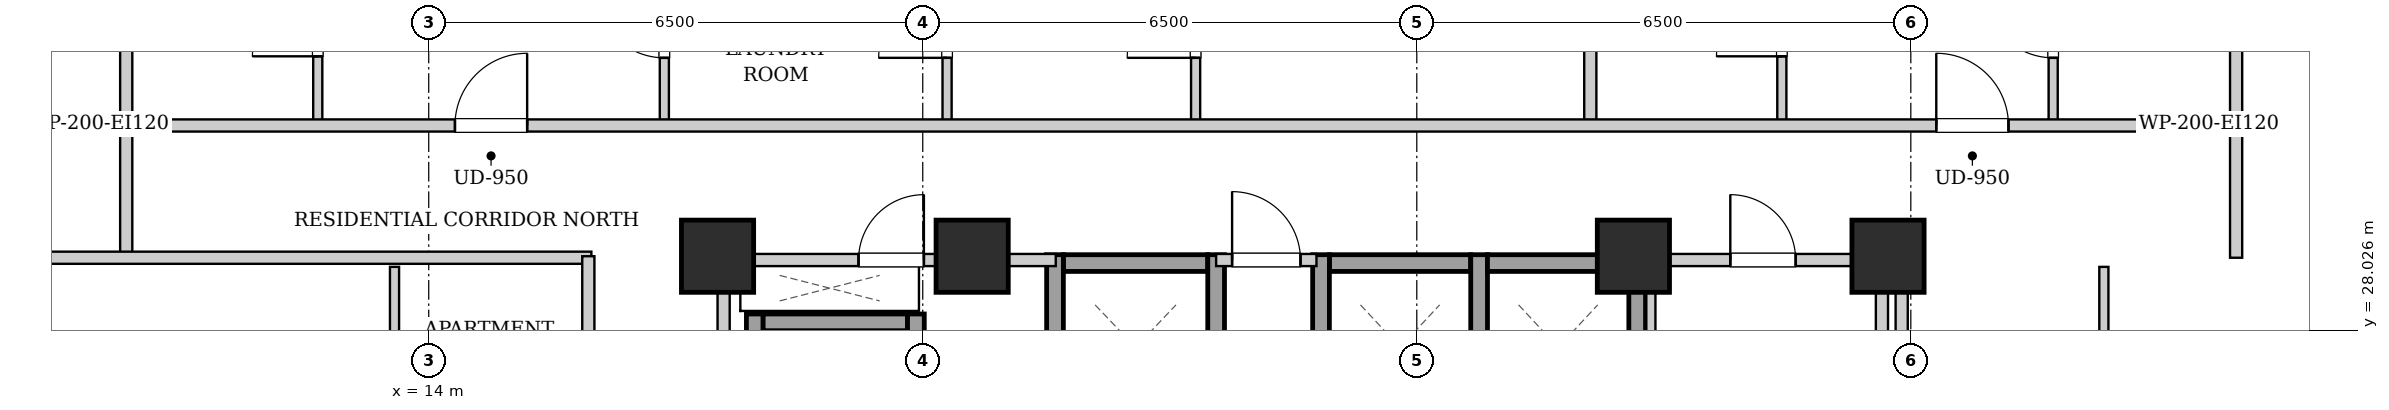
"""IFC4 building model, lengths in metres.
Left out: names, types, materials, properties, quantities, classifications, styles, units other than length and angle.
Written with IfcOpenShell. Run it as: python <this file> out.ifc"""

import sys

from ifc_helpers import new_model, si_unit, direction, frame, frame_2d, origin, origin_2d, place, context, subcontext, project, spatial, rectangle, extrude, element, fill, save


model = new_model("IFC4")
c1 = context("Model", 3, precision=1e-05, world=origin(), true_north=direction((0.0, 1.0)))
c2 = subcontext(c1, "Body", "Model", "MODEL_VIEW")
j1 = project(units=[si_unit("LENGTHUNIT", "METRE"), si_unit("PLANEANGLEUNIT", "RADIAN")], contexts=[c1])
p1 = place(None, origin())
s1 = spatial("IfcSite", under=j1, at=p1, CompositionType="ELEMENT")
p2 = place(p1, origin())
s2 = spatial("IfcBuilding", under=s1, at=p2, CompositionType="ELEMENT")
p3 = place(p2, frame((0.0, 0.0, 127.65)))
s3 = spatial("IfcBuildingStorey", under=s2, at=p3, CompositionType="ELEMENT", Elevation=127.65)
for number, where, z_axis, x_axis in (
    (1, (17.8, 29.0, 0.0), (0.0, 0.0, 1.0), (1.0, 0.0, 0.0)),
    (2, (21.15, 29.0, 0.0), (0.0, 0.0, 1.0), (1.0, 0.0, 0.0)),
    (3, (29.85, 29.0, 0.0), (0.0, 0.0, 1.0), (1.0, 0.0, 0.0)),
    (4, (33.2, 29.0, 0.0), (0.0, 0.0, 1.0), (1.0, 0.0, 0.0)),
):
    element("IfcColumn", number, at=place(p3, frame(where, z_axis=z_axis, x_axis=x_axis)), inside=s3, PredefinedType="COLUMN", context=c2, shape_type="SweptSolid", body=[
        extrude(rectangle(XDim=0.95, YDim=0.95, at=origin_2d()), origin(), (0.0, 0.0, 1.0), 3.25),
    ])
p4 = place(p3, frame((22.35, 28.91, 0.0), z_axis=(0.0, 0.0, 1.0), x_axis=(1.0, 0.0, 0.0)))
e5 = element("IfcWall", 5, at=p4, inside=s3, PredefinedType="SHEAR", context=c2, shape_type="SweptSolid", body=[
    extrude(rectangle(XDim=1.9, YDim=0.22, at=frame_2d((0.95, 0.0))), origin(), (0.0, 0.0, 1.0), 2.99),
])
for number, where, z_axis, x_axis in (
    (6, (22.24, 26.58, 0.0), (0.0, 0.0, 1.0), (0.0, 1.0, 0.0)),
    (7, (24.36, 26.58, 0.0), (0.0, 0.0, 1.0), (0.0, 1.0, 0.0)),
):
    element("IfcWall", number, at=place(p3, frame(where, z_axis=z_axis, x_axis=x_axis)), inside=s3, PredefinedType="SHEAR", context=c2, shape_type="SweptSolid", body=[
        extrude(rectangle(XDim=2.44, YDim=0.22, at=frame_2d((1.22, 0.0))), origin(), (0.0, 0.0, 1.0), 2.99),
    ])
p5 = place(p3, frame((25.85, 28.91, 0.0), z_axis=(0.0, 0.0, 1.0), x_axis=(1.0, 0.0, 0.0)))
e8 = element("IfcWall", 8, at=p5, inside=s3, PredefinedType="SHEAR", context=c2, shape_type="SweptSolid", body=[
    extrude(rectangle(XDim=1.86, YDim=0.22, at=frame_2d((0.93, 0.0))), origin(), (0.0, 0.0, 1.0), 2.99),
])
for number, where, z_axis, x_axis in (
    (9, (25.74, 26.58, 0.0), (0.0, 0.0, 1.0), (0.0, 1.0, 0.0)),
    (10, (27.82, 26.58, 0.0), (0.0, 0.0, 1.0), (0.0, 1.0, 0.0)),
):
    element("IfcWall", number, at=place(p3, frame(where, z_axis=z_axis, x_axis=x_axis)), inside=s3, PredefinedType="SHEAR", context=c2, shape_type="SweptSolid", body=[
        extrude(rectangle(XDim=2.44, YDim=0.22, at=frame_2d((1.22, 0.0))), origin(), (0.0, 0.0, 1.0), 2.99),
    ])
p6 = place(p3, frame((27.93, 28.91, 0.0), z_axis=(0.0, 0.0, 1.0), x_axis=(1.0, 0.0, 0.0)))
e11 = element("IfcWall", 11, at=p6, inside=s3, PredefinedType="SHEAR", context=c2, shape_type="SweptSolid", body=[
    extrude(rectangle(XDim=1.86, YDim=0.22, at=frame_2d((0.93, 0.0))), origin(), (0.0, 0.0, 1.0), 2.99),
])
p7 = place(p3, frame((29.9, 26.58, 0.0), z_axis=(0.0, 0.0, 1.0), x_axis=(0.0, 1.0, 0.0)))
e12 = element("IfcWall", 12, at=p7, inside=s3, PredefinedType="SHEAR", context=c2, shape_type="SweptSolid", body=[
    extrude(rectangle(XDim=2.44, YDim=0.22, at=frame_2d((1.22, 0.0))), origin(), (0.0, 0.0, 1.0), 2.99),
])
p8 = place(p3, frame((18.29, 24.1, 0.0), z_axis=(0.0, 0.0, 1.0), x_axis=(0.0, 1.0, 0.0)))
e13 = element("IfcWall", 13, at=p8, inside=s3, PredefinedType="SHEAR", context=c2, shape_type="SweptSolid", body=[
    extrude(rectangle(XDim=4.14, YDim=0.22, at=frame_2d((2.07, 0.0))), origin(), (0.0, 0.0, 1.0), 2.99),
])
p9 = place(p3, frame((18.4, 28.13, 0.0), z_axis=(0.0, 0.0, 1.0), x_axis=(1.0, 0.0, 0.0)))
e14 = element("IfcWall", 14, at=p9, inside=s3, PredefinedType="SHEAR", context=c2, shape_type="SweptSolid", body=[
    extrude(rectangle(XDim=1.9, YDim=0.22, at=frame_2d((0.95, 0.0))), origin(), (0.0, 0.0, 1.0), 2.99),
])
p10 = place(p3, frame((20.41, 26.06, 0.0), z_axis=(0.0, 0.0, 1.0), x_axis=(0.0, 1.0, 0.0)))
e15 = element("IfcWall", 15, at=p10, inside=s3, PredefinedType="SHEAR", context=c2, shape_type="SweptSolid", body=[
    extrude(rectangle(XDim=2.18, YDim=0.22, at=frame_2d((1.09, 0.0))), origin(), (0.0, 0.0, 1.0), 2.99),
])
for number, where, z_axis, x_axis in (
    (16, (17.88, 24.12, 0.0), (0.0, 0.0, 1.0), (0.0, 1.0, 0.0)),
    (17, (33.12, 24.12, 0.0), (0.0, 0.0, 1.0), (0.0, 1.0, 0.0)),
):
    element("IfcWall", number, at=place(p3, frame(where, z_axis=z_axis, x_axis=x_axis)), inside=s3, PredefinedType="PARTITIONING", context=c2, shape_type="SweptSolid", body=[
        extrude(rectangle(XDim=4.76, YDim=0.16, at=frame_2d((2.38, 0.0))), origin(), (0.0, 0.0, 1.0), 2.325),
    ])
p11 = place(p3, frame((24.36, 28.95, 0.0), z_axis=(0.0, 0.0, 1.0), x_axis=(1.0, 0.0, 0.0)))
e18 = element("IfcWall", 18, at=p11, inside=s3, PredefinedType="PARTITIONING", context=c2, shape_type="SweptSolid", body=[
    extrude(rectangle(XDim=1.32, YDim=0.16, at=frame_2d((0.66, 0.0))), origin(), (0.0, 0.0, 1.0), 2.426),
])
p12 = place(p11, frame((0.21, 0.0, 0.0)))
e19 = element("IfcOpeningElement", 19, at=p12, cuts=e18, PredefinedType="OPENING", context=c2, shape_type="SweptSolid", body=[
    extrude(rectangle(XDim=0.9, YDim=2.05, at=frame_2d((0.45, 1.025))), frame((0.0, 0.09, 0.0), z_axis=(0.0, -1.0, 0.0), x_axis=(1.0, 0.0, 0.0)), (0.0, 0.0, 1.0), 0.18),
])
p13 = place(p3, frame((17.96, 28.95, 0.0), z_axis=(0.0, 0.0, 1.0), x_axis=(1.0, 0.0, 0.0)))
e20 = element("IfcWall", 20, at=p13, inside=s3, PredefinedType="PARTITIONING", context=c2, shape_type="SweptSolid", body=[
    extrude(rectangle(XDim=4.29, YDim=0.16, at=frame_2d((2.145, 0.0))), origin(), (0.0, 0.0, 1.0), 2.426),
])
p14 = place(p13, frame((1.695, 0.0, 0.0)))
e21 = element("IfcOpeningElement", 21, at=p14, cuts=e20, PredefinedType="OPENING", context=c2, shape_type="SweptSolid", body=[
    extrude(rectangle(XDim=0.86, YDim=2.05, at=frame_2d((0.43, 1.025))), frame((0.0, 0.09, 0.0), z_axis=(0.0, -1.0, 0.0), x_axis=(1.0, 0.0, 0.0)), (0.0, 0.0, 1.0), 0.18),
])
p15 = place(p3, frame((30.08, 26.18, 0.0), z_axis=(0.0, 0.0, 1.0), x_axis=(0.0, 1.0, 0.0)))
e22 = element("IfcWall", 22, at=p15, inside=s3, PredefinedType="PARTITIONING", context=c2, shape_type="SweptSolid", body=[
    extrude(rectangle(XDim=2.68, YDim=0.12, at=frame_2d((1.34, 0.0))), origin(), (0.0, 0.0, 1.0), 2.99),
])
p16 = place(p3, frame((30.08, 28.95, 0.0), z_axis=(0.0, 0.0, 1.0), x_axis=(1.0, 0.0, 0.0)))
e23 = element("IfcWall", 23, at=p16, inside=s3, PredefinedType="PARTITIONING", context=c2, shape_type="SweptSolid", body=[
    extrude(rectangle(XDim=2.96, YDim=0.16, at=frame_2d((1.48, 0.0))), origin(), (0.0, 0.0, 1.0), 2.99),
])
p17 = place(p16, frame((1.045, 0.0, 0.0)))
e24 = element("IfcOpeningElement", 24, at=p17, cuts=e23, PredefinedType="OPENING", context=c2, shape_type="SweptSolid", body=[
    extrude(rectangle(XDim=0.86, YDim=2.05, at=frame_2d((0.43, 1.025))), frame((0.0, 0.09, 0.0), z_axis=(0.0, -1.0, 0.0), x_axis=(1.0, 0.0, 0.0)), (0.0, 0.0, 1.0), 0.18),
])
for number, where, z_axis, x_axis in (
    (25, (10.02, 28.98, 0.0), (0.0, 0.0, 1.0), (0.0, 1.0, 0.0)),
    (26, (37.78, 28.98, 0.0), (0.0, 0.0, 1.0), (0.0, 1.0, 0.0)),
):
    element("IfcWall", number, at=place(p3, frame(where, z_axis=z_axis, x_axis=x_axis)), inside=s3, PredefinedType="PARTITIONING", context=c2, shape_type="SweptSolid", body=[
        extrude(rectangle(XDim=1.74, YDim=0.16, at=frame_2d((0.87, 0.0))), origin(), (0.0, 0.0, 1.0), 2.99),
    ])
p18 = place(p3, frame((7.78, 28.98, 0.0), z_axis=(0.0, 0.0, 1.0), x_axis=(1.0, 0.0, 0.0)))
e27 = element("IfcWall", 27, at=p18, inside=s3, PredefinedType="PARTITIONING", context=c2, shape_type="SweptSolid", body=[
    extrude(rectangle(XDim=8.36, YDim=0.16, at=frame_2d((4.18, 0.0))), origin(), (0.0, 0.0, 1.0), 2.426),
])
p19 = place(p3, frame((10.02, 30.76, 0.0), z_axis=(0.0, 0.0, 1.0), x_axis=(0.0, 1.0, 0.0)))
e28 = element("IfcWall", 28, at=p19, inside=s3, PredefinedType="PARTITIONING", context=c2, shape_type="SweptSolid", body=[
    extrude(rectangle(XDim=2.66, YDim=0.16, at=frame_2d((1.33, 0.0))), origin(), (0.0, 0.0, 1.0), 2.99),
])
p20 = place(p3, frame((12.54, 30.76, 0.0), z_axis=(0.0, 0.0, 1.0), x_axis=(0.0, 1.0, 0.0)))
e29 = element("IfcWall", 29, at=p20, inside=s3, PredefinedType="PARTITIONING", context=c2, shape_type="SweptSolid", body=[
    extrude(rectangle(XDim=2.6, YDim=0.12, at=frame_2d((1.3, 0.0))), origin(), (0.0, 0.0, 1.0), 2.99),
])
p21 = place(p20, frame((0.87, 0.0, 0.0)))
e30 = element("IfcOpeningElement", 30, at=p21, cuts=e29, PredefinedType="OPENING", context=c2, shape_type="SweptSolid", body=[
    extrude(rectangle(XDim=0.86, YDim=2.05, at=frame_2d((0.43, 1.025))), frame((0.0, 0.07, 0.0), z_axis=(0.0, -1.0, 0.0), x_axis=(1.0, 0.0, 0.0)), (0.0, 0.0, 1.0), 0.14),
])
p22 = place(p3, frame((17.1, 30.76, 0.0), z_axis=(0.0, 0.0, 1.0), x_axis=(0.0, 1.0, 0.0)))
e31 = element("IfcWall", 31, at=p22, inside=s3, PredefinedType="PARTITIONING", context=c2, shape_type="SweptSolid", body=[
    extrude(rectangle(XDim=2.6, YDim=0.12, at=frame_2d((1.3, 0.0))), origin(), (0.0, 0.0, 1.0), 2.99),
])
p23 = place(p22, frame((0.85, 0.0, 0.0)))
e32 = element("IfcOpeningElement", 32, at=p23, cuts=e31, PredefinedType="OPENING", context=c2, shape_type="SweptSolid", body=[
    extrude(rectangle(XDim=0.9, YDim=2.05, at=frame_2d((0.45, 1.025))), frame((0.0, 0.07, 0.0), z_axis=(0.0, -1.0, 0.0), x_axis=(1.0, 0.0, 0.0)), (0.0, 0.0, 1.0), 0.14),
])
p24 = place(p3, frame((20.82, 30.76, 0.0), z_axis=(0.0, 0.0, 1.0), x_axis=(0.0, 1.0, 0.0)))
e33 = element("IfcWall", 33, at=p24, inside=s3, PredefinedType="PARTITIONING", context=c2, shape_type="SweptSolid", body=[
    extrude(rectangle(XDim=2.6, YDim=0.12, at=frame_2d((1.3, 0.0))), origin(), (0.0, 0.0, 1.0), 2.99),
])
p25 = place(p24, frame((0.85, 0.0, 0.0)))
e34 = element("IfcOpeningElement", 34, at=p25, cuts=e33, PredefinedType="OPENING", context=c2, shape_type="SweptSolid", body=[
    extrude(rectangle(XDim=0.9, YDim=2.05, at=frame_2d((0.45, 1.025))), frame((0.0, 0.07, 0.0), z_axis=(0.0, -1.0, 0.0), x_axis=(1.0, 0.0, 0.0)), (0.0, 0.0, 1.0), 0.14),
])
p26 = place(p3, frame((24.09, 30.76, 0.0), z_axis=(0.0, 0.0, 1.0), x_axis=(0.0, 1.0, 0.0)))
e35 = element("IfcWall", 35, at=p26, inside=s3, PredefinedType="PARTITIONING", context=c2, shape_type="SweptSolid", body=[
    extrude(rectangle(XDim=2.6, YDim=0.12, at=frame_2d((1.3, 0.0))), origin(), (0.0, 0.0, 1.0), 2.99),
])
p27 = place(p26, frame((0.85, 0.0, 0.0)))
e36 = element("IfcOpeningElement", 36, at=p27, cuts=e35, PredefinedType="OPENING", context=c2, shape_type="SweptSolid", body=[
    extrude(rectangle(XDim=0.9, YDim=2.05, at=frame_2d((0.45, 1.025))), frame((0.0, 0.07, 0.0), z_axis=(0.0, -1.0, 0.0), x_axis=(1.0, 0.0, 0.0)), (0.0, 0.0, 1.0), 0.14),
])
p28 = place(p3, frame((37.78, 30.76, 0.0), z_axis=(0.0, 0.0, 1.0), x_axis=(0.0, 1.0, 0.0)))
e37 = element("IfcWall", 37, at=p28, inside=s3, PredefinedType="PARTITIONING", context=c2, shape_type="SweptSolid", body=[
    extrude(rectangle(XDim=2.66, YDim=0.16, at=frame_2d((1.33, 0.0))), origin(), (0.0, 0.0, 1.0), 2.99),
])
p29 = place(p3, frame((29.283, 30.76, 0.0), z_axis=(0.0, 0.0, 1.0), x_axis=(0.0, 1.0, 0.0)))
e38 = element("IfcWall", 38, at=p29, inside=s3, PredefinedType="PARTITIONING", context=c2, shape_type="SweptSolid", body=[
    extrude(rectangle(XDim=12.26, YDim=0.16, at=frame_2d((6.13, 0.0))), origin(), (0.0, 0.0, 1.0), 2.99),
])
p30 = place(p3, frame((31.803, 30.76, 0.0), z_axis=(0.0, 0.0, 1.0), x_axis=(0.0, 1.0, 0.0)))
e39 = element("IfcWall", 39, at=p30, inside=s3, PredefinedType="PARTITIONING", context=c2, shape_type="SweptSolid", body=[
    extrude(rectangle(XDim=2.6, YDim=0.12, at=frame_2d((1.3, 0.0))), origin(), (0.0, 0.0, 1.0), 2.99),
])
p31 = place(p30, frame((0.87, 0.0, 0.0)))
e40 = element("IfcOpeningElement", 40, at=p31, cuts=e39, PredefinedType="OPENING", context=c2, shape_type="SweptSolid", body=[
    extrude(rectangle(XDim=0.86, YDim=2.05, at=frame_2d((0.43, 1.025))), frame((0.0, 0.07, 0.0), z_axis=(0.0, -1.0, 0.0), x_axis=(1.0, 0.0, 0.0)), (0.0, 0.0, 1.0), 0.14),
])
p32 = place(p3, frame((35.373, 30.76, 0.0), z_axis=(0.0, 0.0, 1.0), x_axis=(0.0, 1.0, 0.0)))
e41 = element("IfcWall", 41, at=p32, inside=s3, PredefinedType="PARTITIONING", context=c2, shape_type="SweptSolid", body=[
    extrude(rectangle(XDim=2.6, YDim=0.12, at=frame_2d((1.3, 0.0))), origin(), (0.0, 0.0, 1.0), 2.99),
])
p33 = place(p32, frame((0.85, 0.0, 0.0)))
e42 = element("IfcOpeningElement", 42, at=p33, cuts=e41, PredefinedType="OPENING", context=c2, shape_type="SweptSolid", body=[
    extrude(rectangle(XDim=0.9, YDim=2.05, at=frame_2d((0.45, 1.025))), frame((0.0, 0.07, 0.0), z_axis=(0.0, -1.0, 0.0), x_axis=(1.0, 0.0, 0.0)), (0.0, 0.0, 1.0), 0.14),
])
p34 = place(p3, frame((13.55, 23.527, 0.0), z_axis=(0.0, 0.0, 1.0), x_axis=(0.0, 1.0, 0.0)))
e43 = element("IfcWall", 43, at=p34, inside=s3, PredefinedType="PARTITIONING", context=c2, shape_type="SweptSolid", body=[
    extrude(rectangle(XDim=5.333, YDim=0.12, at=frame_2d((2.667, 0.0))), origin(), (0.0, 0.0, 1.0), 2.99),
])
p35 = place(p34, frame((2.216, 0.0, 0.0)))
e44 = element("IfcOpeningElement", 44, at=p35, cuts=e43, PredefinedType="OPENING", context=c2, shape_type="SweptSolid", body=[
    extrude(rectangle(XDim=0.9, YDim=2.05, at=frame_2d((0.45, 1.025))), frame((0.0, 0.07, 0.0), z_axis=(0.0, -1.0, 0.0), x_axis=(1.0, 0.0, 0.0)), (0.0, 0.0, 1.0), 0.14),
])
p36 = place(p3, frame((36.04, 24.552, 0.0), z_axis=(0.0, 0.0, 1.0), x_axis=(0.0, 1.0, 0.0)))
e45 = element("IfcWall", 45, at=p36, inside=s3, PredefinedType="PARTITIONING", context=c2, shape_type="SweptSolid", body=[
    extrude(rectangle(XDim=4.308, YDim=0.12, at=frame_2d((2.154, 0.0))), origin(), (0.0, 0.0, 1.0), 2.99),
])
p37 = place(p36, frame((1.704, 0.0, 0.0)))
e46 = element("IfcOpeningElement", 46, at=p37, cuts=e45, PredefinedType="OPENING", context=c2, shape_type="SweptSolid", body=[
    extrude(rectangle(XDim=0.9, YDim=2.05, at=frame_2d((0.45, 1.025))), frame((0.0, 0.07, 0.0), z_axis=(0.0, -1.0, 0.0), x_axis=(1.0, 0.0, 0.0)), (0.0, 0.0, 1.0), 0.14),
])
p38 = place(p3, frame((10.05, 30.72, 0.0), z_axis=(0.0, 0.0, 1.0), x_axis=(1.0, 0.0, 0.0)))
e47 = element("IfcWall", 47, at=p38, inside=s3, PredefinedType="PARTITIONING", context=c2, shape_type="SweptSolid", body=[
    extrude(rectangle(XDim=27.7, YDim=0.16, at=frame_2d((13.85, 0.0))), origin(), (0.0, 0.0, 1.0), 2.99),
])
p39 = place(p38, frame((4.295, 0.0, 0.0)))
e48 = element("IfcOpeningElement", 48, at=p39, cuts=e47, PredefinedType="OPENING", context=c2, shape_type="SweptSolid", body=[
    extrude(rectangle(XDim=0.95, YDim=2.1, at=frame_2d((0.475, 1.05))), frame((0.0, 0.09, 0.0), z_axis=(0.0, -1.0, 0.0), x_axis=(1.0, 0.0, 0.0)), (0.0, 0.0, 1.0), 0.18),
])
p40 = place(p38, frame((23.785, 0.0, 0.0)))
e49 = element("IfcOpeningElement", 49, at=p40, cuts=e47, PredefinedType="OPENING", context=c2, shape_type="SweptSolid", body=[
    extrude(rectangle(XDim=0.95, YDim=2.1, at=frame_2d((0.475, 1.05))), frame((0.0, 0.09, 0.0), z_axis=(0.0, -1.0, 0.0), x_axis=(1.0, 0.0, 0.0)), (0.0, 0.0, 1.0), 0.18),
])
p41 = place(p3, frame((16.1, 15.07, 0.0), z_axis=(0.0, 0.0, 1.0), x_axis=(0.0, 1.0, 0.0)))
e50 = element("IfcWall", 50, at=p41, inside=s3, PredefinedType="PARTITIONING", context=c2, shape_type="SweptSolid", body=[
    extrude(rectangle(XDim=13.93, YDim=0.16, at=frame_2d((6.965, 0.0))), origin(), (0.0, 0.0, 1.0), 2.99),
])
p42 = place(p41, frame((3.608, 0.0, 0.0)))
e51 = element("IfcOpeningElement", 51, at=p42, cuts=e50, PredefinedType="OPENING", context=c2, shape_type="SweptSolid", body=[
    extrude(rectangle(XDim=0.95, YDim=2.1, at=frame_2d((0.475, 1.05))), frame((0.0, 0.09, 0.0), z_axis=(0.0, -1.0, 0.0), x_axis=(1.0, 0.0, 0.0)), (0.0, 0.0, 1.0), 0.18),
])
p43 = place(p41, frame((10.649, 0.0, 0.0)))
e52 = element("IfcOpeningElement", 52, at=p43, cuts=e50, PredefinedType="OPENING", context=c2, shape_type="SweptSolid", body=[
    extrude(rectangle(XDim=0.95, YDim=2.1, at=frame_2d((0.475, 1.05))), frame((0.0, 0.09, 0.0), z_axis=(0.0, -1.0, 0.0), x_axis=(1.0, 0.0, 0.0)), (0.0, 0.0, 1.0), 0.18),
])
p44 = place(p3, frame((33.38, 15.02, 0.0), z_axis=(0.0, 0.0, 1.0), x_axis=(0.0, 1.0, 0.0)))
e53 = element("IfcWall", 53, at=p44, inside=s3, PredefinedType="PARTITIONING", context=c2, shape_type="SweptSolid", body=[
    extrude(rectangle(XDim=13.98, YDim=0.16, at=frame_2d((6.99, 0.0))), origin(), (0.0, 0.0, 1.0), 2.325),
])
p45 = place(p12, origin())
e54 = element("IfcDoor", 54, at=p45, inside=s3, OperationType="SINGLE_SWING_LEFT", PredefinedType="DOOR", context=c2, shape_type="SweptSolid", body=[
    extrude(rectangle(XDim=0.9, YDim=2.05, at=frame_2d((0.45, 1.025))), frame((0.0, 0.025, 0.0), z_axis=(0.0, -1.0, 0.0), x_axis=(1.0, 0.0, 0.0)), (0.0, 0.0, 1.0), 0.05),
])
fill(e19, e54)
p46 = place(p14, origin())
e55 = element("IfcDoor", 55, at=p46, inside=s3, OperationType="SINGLE_SWING_RIGHT", PredefinedType="DOOR", context=c2, shape_type="SweptSolid", body=[
    extrude(rectangle(XDim=0.86, YDim=2.05, at=frame_2d((0.43, 1.025))), frame((0.0, 0.025, 0.0), z_axis=(0.0, -1.0, 0.0), x_axis=(1.0, 0.0, 0.0)), (0.0, 0.0, 1.0), 0.05),
])
fill(e21, e55)
p47 = place(p17, origin())
e56 = element("IfcDoor", 56, at=p47, inside=s3, OperationType="SINGLE_SWING_LEFT", PredefinedType="DOOR", context=c2, shape_type="SweptSolid", body=[
    extrude(rectangle(XDim=0.86, YDim=2.05, at=frame_2d((0.43, 1.025))), frame((0.0, 0.025, 0.0), z_axis=(0.0, -1.0, 0.0), x_axis=(1.0, 0.0, 0.0)), (0.0, 0.0, 1.0), 0.05),
])
fill(e24, e56)
p48 = place(p21, origin())
e57 = element("IfcDoor", 57, at=p48, inside=s3, OperationType="SINGLE_SWING_LEFT", PredefinedType="DOOR", context=c2, shape_type="SweptSolid", body=[
    extrude(rectangle(XDim=0.86, YDim=2.05, at=frame_2d((0.43, 1.025))), frame((0.0, 0.025, 0.0), z_axis=(0.0, -1.0, 0.0), x_axis=(1.0, 0.0, 0.0)), (0.0, 0.0, 1.0), 0.05),
])
fill(e30, e57)
p49 = place(p23, origin())
e58 = element("IfcDoor", 58, at=p49, inside=s3, OperationType="SINGLE_SWING_RIGHT", PredefinedType="DOOR", context=c2, shape_type="SweptSolid", body=[
    extrude(rectangle(XDim=0.9, YDim=2.05, at=frame_2d((0.45, 1.025))), frame((0.0, 0.025, 0.0), z_axis=(0.0, -1.0, 0.0), x_axis=(1.0, 0.0, 0.0)), (0.0, 0.0, 1.0), 0.05),
])
fill(e32, e58)
p50 = place(p25, origin())
e59 = element("IfcDoor", 59, at=p50, inside=s3, OperationType="SINGLE_SWING_LEFT", PredefinedType="DOOR", context=c2, shape_type="SweptSolid", body=[
    extrude(rectangle(XDim=0.9, YDim=2.05, at=frame_2d((0.45, 1.025))), frame((0.0, 0.025, 0.0), z_axis=(0.0, -1.0, 0.0), x_axis=(1.0, 0.0, 0.0)), (0.0, 0.0, 1.0), 0.05),
])
fill(e34, e59)
p51 = place(p27, origin())
e60 = element("IfcDoor", 60, at=p51, inside=s3, OperationType="SINGLE_SWING_LEFT", PredefinedType="DOOR", context=c2, shape_type="SweptSolid", body=[
    extrude(rectangle(XDim=0.9, YDim=2.05, at=frame_2d((0.45, 1.025))), frame((0.0, 0.025, 0.0), z_axis=(0.0, -1.0, 0.0), x_axis=(1.0, 0.0, 0.0)), (0.0, 0.0, 1.0), 0.05),
])
fill(e36, e60)
p52 = place(p31, origin())
e61 = element("IfcDoor", 61, at=p52, inside=s3, OperationType="SINGLE_SWING_LEFT", PredefinedType="DOOR", context=c2, shape_type="SweptSolid", body=[
    extrude(rectangle(XDim=0.86, YDim=2.05, at=frame_2d((0.43, 1.025))), frame((0.0, 0.025, 0.0), z_axis=(0.0, -1.0, 0.0), x_axis=(1.0, 0.0, 0.0)), (0.0, 0.0, 1.0), 0.05),
])
fill(e40, e61)
p53 = place(p33, origin())
e62 = element("IfcDoor", 62, at=p53, inside=s3, OperationType="SINGLE_SWING_RIGHT", PredefinedType="DOOR", context=c2, shape_type="SweptSolid", body=[
    extrude(rectangle(XDim=0.9, YDim=2.05, at=frame_2d((0.45, 1.025))), frame((0.0, 0.025, 0.0), z_axis=(0.0, -1.0, 0.0), x_axis=(1.0, 0.0, 0.0)), (0.0, 0.0, 1.0), 0.05),
])
fill(e42, e62)
p54 = place(p39, origin())
e63 = element("IfcDoor", 63, at=p54, inside=s3, OperationType="SINGLE_SWING_RIGHT", PredefinedType="DOOR", context=c2, shape_type="SweptSolid", body=[
    extrude(rectangle(XDim=0.95, YDim=2.1, at=frame_2d((0.475, 1.05))), frame((0.0, 0.025, 0.0), z_axis=(0.0, -1.0, 0.0), x_axis=(1.0, 0.0, 0.0)), (0.0, 0.0, 1.0), 0.05),
])
fill(e48, e63)
p55 = place(p40, origin())
e64 = element("IfcDoor", 64, at=p55, inside=s3, OperationType="SINGLE_SWING_LEFT", PredefinedType="DOOR", context=c2, shape_type="SweptSolid", body=[
    extrude(rectangle(XDim=0.95, YDim=2.1, at=frame_2d((0.475, 1.05))), frame((0.0, 0.025, 0.0), z_axis=(0.0, -1.0, 0.0), x_axis=(1.0, 0.0, 0.0)), (0.0, 0.0, 1.0), 0.05),
])
fill(e49, e64)
save(model, sys.argv[1])
